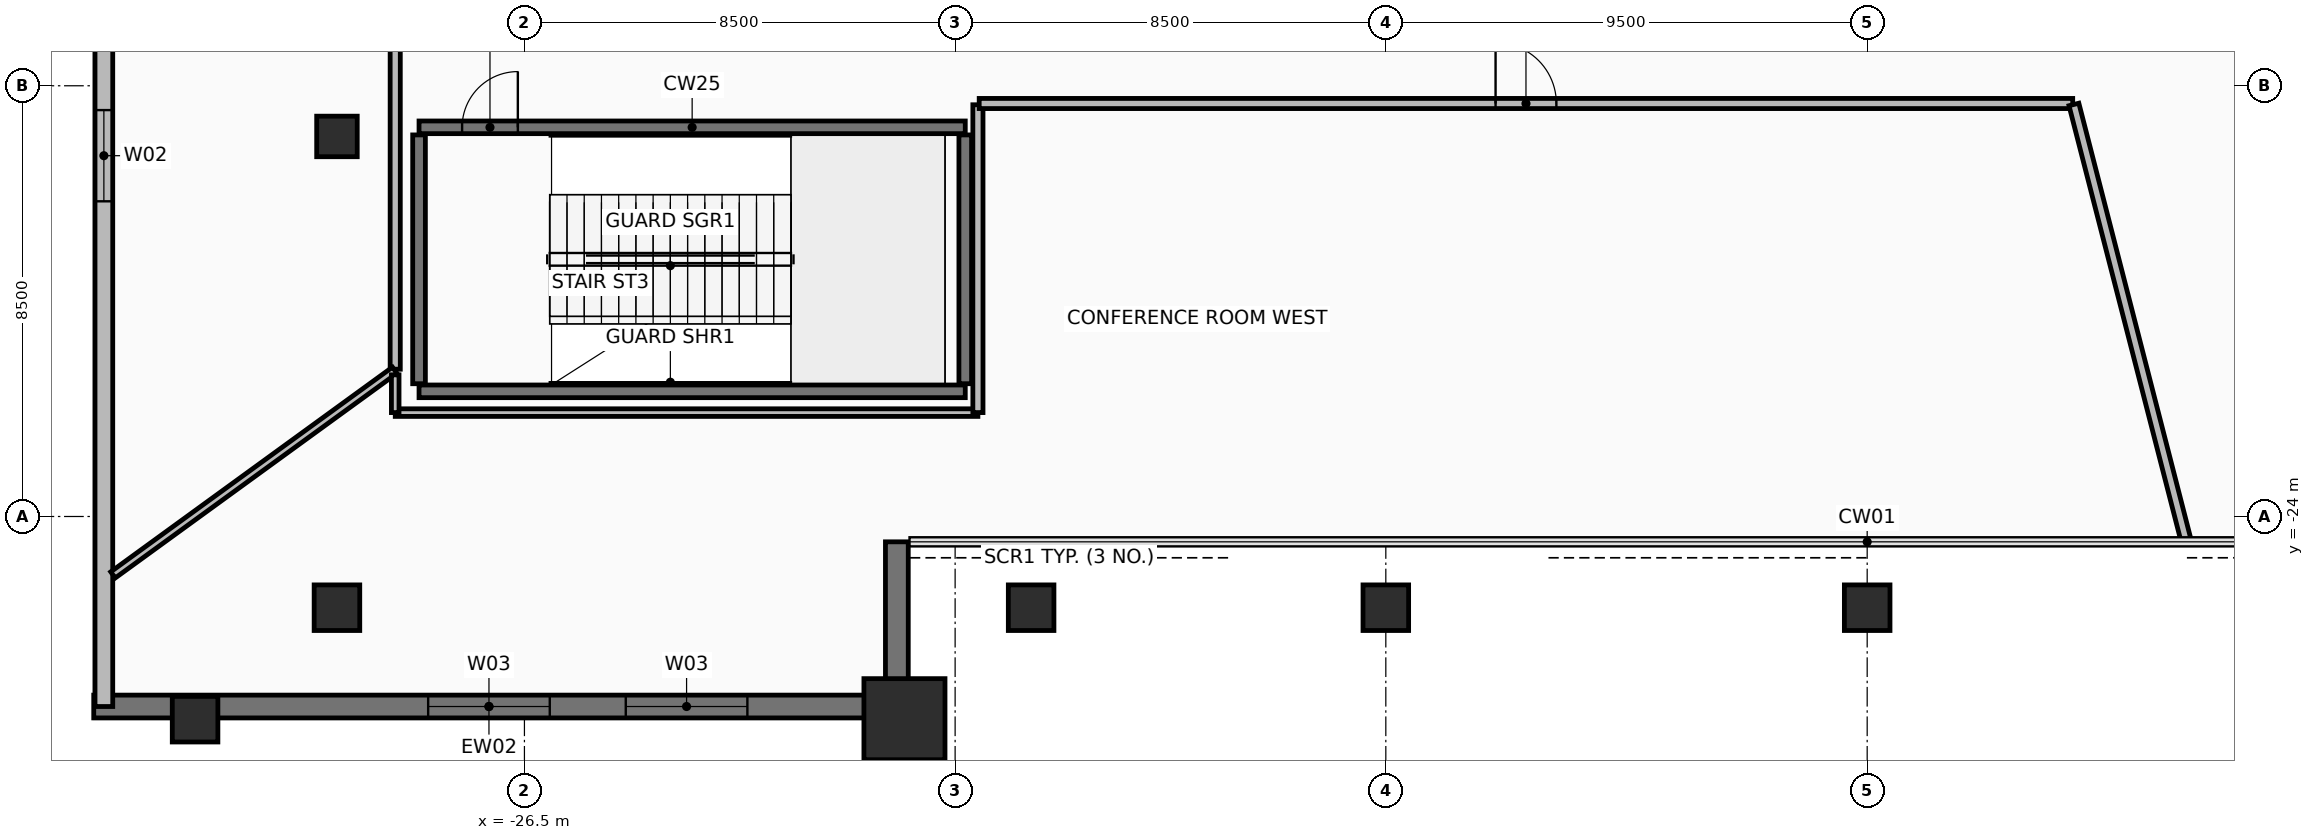
"""IFC4 building model, lengths in metres.
Left out: names, types, materials, properties, quantities, classifications, styles, units other than length and angle.
Written with IfcOpenShell. Run it as: python <this file> out.ifc"""

import sys

from ifc_helpers import new_model, si_unit, direction, frame, frame_2d, origin, origin_2d, place, context, subcontext, project, spatial, rectangle, hollow_rectangle, extrude, element, fill, save


model = new_model("IFC4")
c1 = context("Model", 3, precision=1e-05, world=origin(), true_north=direction((0.0, 1.0)))
c2 = subcontext(c1, "Body", "Model", "MODEL_VIEW")
j1 = project(units=[si_unit("LENGTHUNIT", "METRE"), si_unit("PLANEANGLEUNIT", "RADIAN")], contexts=[c1])
p1 = place(None, origin())
s1 = spatial("IfcSite", under=j1, at=p1, CompositionType="ELEMENT")
p2 = place(p1, origin())
s2 = spatial("IfcBuilding", under=s1, at=p2, CompositionType="ELEMENT")
p3 = place(p2, frame((0.0, 0.0, 11.0)))
s3 = spatial("IfcBuildingStorey", under=s2, at=p3, CompositionType="ELEMENT", Elevation=11.0)
for number, where, z_axis, x_axis in (
    (1, (-30.2, -25.8, 0.0), (0.0, 0.0, 1.0), (1.0, 0.0, 0.0)),
    (2, (-16.5, -25.8, 0.0), (0.0, 0.0, 1.0), (1.0, 0.0, 0.0)),
    (3, (-9.5, -25.8, 0.0), (0.0, 0.0, 1.0), (1.0, 0.0, 0.0)),
    (4, (0.0, -25.8, 0.0), (0.0, 0.0, 1.0), (1.0, 0.0, 0.0)),
):
    element("IfcColumn", number, at=place(p3, frame(where, z_axis=z_axis, x_axis=x_axis)), inside=s3, PredefinedType="COLUMN", context=c2, shape_type="SweptSolid", body=[
        extrude(hollow_rectangle(XDim=0.9, YDim=0.9, WallThickness=0.05, at=origin_2d()), origin(), (0.0, 0.0, 1.0), 5.5),
    ])
p4 = place(p3, frame((-30.2, -16.5, 0.0), z_axis=(0.0, 0.0, 1.0), x_axis=(1.0, 0.0, 0.0)))
e5 = element("IfcColumn", 5, at=p4, inside=s3, PredefinedType="COLUMN", context=c2, shape_type="SweptSolid", body=[
    extrude(hollow_rectangle(XDim=0.8, YDim=0.8, WallThickness=0.045, at=origin_2d()), origin(), (0.0, 0.0, 1.0), 5.5),
])
p5 = place(p3, frame((-19.0, -28.0, 0.0), z_axis=(0.0, 0.0, 1.0), x_axis=(1.0, 0.0, 0.0)))
e6 = element("IfcColumn", 6, at=p5, inside=s3, PredefinedType="COLUMN", context=c2, shape_type="SweptSolid", body=[
    extrude(rectangle(XDim=1.6, YDim=1.6, at=origin_2d()), origin(), (0.0, 0.0, 1.0), 5.5),
])
p6 = place(p3, frame((-33.0, -28.0, 0.0), z_axis=(0.0, 0.0, 1.0), x_axis=(1.0, 0.0, 0.0)))
e7 = element("IfcColumn", 7, at=p6, inside=s3, PredefinedType="COLUMN", context=c2, shape_type="SweptSolid", body=[
    extrude(hollow_rectangle(XDim=0.9, YDim=0.9, WallThickness=0.05, at=origin_2d()), origin(), (0.0, 0.0, 1.0), 5.5),
])
p7 = place(p3, frame((-35.0, -27.75, 0.0), z_axis=(0.0, 0.0, 1.0), x_axis=(1.0, 0.0, 0.0)))
e8 = element("IfcWall", 8, at=p7, inside=s3, PredefinedType="STANDARD", context=c2, shape_type="SweptSolid", body=[
    extrude(rectangle(XDim=15.6, YDim=0.45, at=frame_2d((7.8, 0.0))), origin(), (0.0, 0.0, 1.0), 5.24),
])
p8 = place(p7, frame((6.6, 0.0, 0.9)))
e9 = element("IfcOpeningElement", 9, at=p8, cuts=e8, PredefinedType="OPENING", context=c2, shape_type="SweptSolid", body=[
    extrude(rectangle(XDim=2.4, YDim=2.4, at=frame_2d((1.2, 1.2))), frame((0.0, 0.235, 0.0), z_axis=(0.0, -1.0, 0.0), x_axis=(1.0, 0.0, 0.0)), (0.0, 0.0, 1.0), 0.47),
])
p9 = place(p7, frame((10.5, 0.0, 0.9)))
e10 = element("IfcOpeningElement", 10, at=p9, cuts=e8, PredefinedType="OPENING", context=c2, shape_type="SweptSolid", body=[
    extrude(rectangle(XDim=2.4, YDim=2.4, at=frame_2d((1.2, 1.2))), frame((0.0, 0.235, 0.0), z_axis=(0.0, -1.0, 0.0), x_axis=(1.0, 0.0, 0.0)), (0.0, 0.0, 1.0), 0.47),
])
p10 = place(p3, frame((-19.15, -27.75, 0.0), z_axis=(0.0, 0.0, 1.0), x_axis=(0.0, 1.0, 0.0)))
e11 = element("IfcWall", 11, at=p10, inside=s3, PredefinedType="STANDARD", context=c2, shape_type="SweptSolid", body=[
    extrude(rectangle(XDim=3.25, YDim=0.45, at=frame_2d((1.625, 0.0))), origin(), (0.0, 0.0, 1.0), 5.24),
])
p11 = place(p3, frame((-34.8, 26.6, 0.0), z_axis=(0.0, 0.0, 1.0), x_axis=(0.0, -1.0, 0.0)))
e12 = element("IfcWall", 12, at=p11, inside=s3, PredefinedType="STANDARD", context=c2, shape_type="SweptSolid", body=[
    extrude(rectangle(XDim=54.35, YDim=0.35, at=frame_2d((27.175, 0.0))), origin(), (0.0, 0.0, 1.0), 5.24),
])
p12 = place(p11, frame((9.97, 0.0, 0.95)))
e13 = element("IfcOpeningElement", 13, at=p12, cuts=e12, PredefinedType="OPENING", context=c2, shape_type="SweptSolid", body=[
    extrude(rectangle(XDim=1.8, YDim=2.2, at=frame_2d((0.9, 1.1))), frame((0.0, 0.185, 0.0), z_axis=(0.0, -1.0, 0.0), x_axis=(1.0, 0.0, 0.0)), (0.0, 0.0, 1.0), 0.37),
])
p13 = place(p11, frame((20.84, 0.0, 0.95)))
e14 = element("IfcOpeningElement", 14, at=p13, cuts=e12, PredefinedType="OPENING", context=c2, shape_type="SweptSolid", body=[
    extrude(rectangle(XDim=1.8, YDim=2.2, at=frame_2d((0.9, 1.1))), frame((0.0, 0.185, 0.0), z_axis=(0.0, -1.0, 0.0), x_axis=(1.0, 0.0, 0.0)), (0.0, 0.0, 1.0), 0.37),
])
p14 = place(p11, frame((31.71, 0.0, 0.95)))
e15 = element("IfcOpeningElement", 15, at=p14, cuts=e12, PredefinedType="OPENING", context=c2, shape_type="SweptSolid", body=[
    extrude(rectangle(XDim=1.8, YDim=2.2, at=frame_2d((0.9, 1.1))), frame((0.0, 0.185, 0.0), z_axis=(0.0, -1.0, 0.0), x_axis=(1.0, 0.0, 0.0)), (0.0, 0.0, 1.0), 0.37),
])
p15 = place(p11, frame((42.58, 0.0, 0.95)))
e16 = element("IfcOpeningElement", 16, at=p15, cuts=e12, PredefinedType="OPENING", context=c2, shape_type="SweptSolid", body=[
    extrude(rectangle(XDim=1.8, YDim=2.2, at=frame_2d((0.9, 1.1))), frame((0.0, 0.185, 0.0), z_axis=(0.0, -1.0, 0.0), x_axis=(1.0, 0.0, 0.0)), (0.0, 0.0, 1.0), 0.37),
])
p16 = place(p3, frame((-28.58, -16.32, 0.0), z_axis=(0.0, 0.0, 1.0), x_axis=(1.0, 0.0, 0.0)))
e17 = element("IfcWall", 17, at=p16, inside=s3, PredefinedType="SHEAR", context=c2, shape_type="SweptSolid", body=[
    extrude(rectangle(XDim=10.78, YDim=0.25, at=frame_2d((5.39, 0.0))), origin(), (0.0, 0.0, 1.0), 5.24),
])
p17 = place(p16, frame((0.85, 0.0, 0.0)))
e18 = element("IfcOpeningElement", 18, at=p17, cuts=e17, PredefinedType="OPENING", context=c2, shape_type="SweptSolid", body=[
    extrude(rectangle(XDim=1.1, YDim=2.15, at=frame_2d((0.55, 1.075))), frame((0.0, 0.135, 0.0), z_axis=(0.0, -1.0, 0.0), x_axis=(1.0, 0.0, 0.0)), (0.0, 0.0, 1.0), 0.27),
])
p18 = place(p3, frame((-28.58, -21.53, 0.0), z_axis=(0.0, 0.0, 1.0), x_axis=(1.0, 0.0, 0.0)))
e19 = element("IfcWall", 19, at=p18, inside=s3, PredefinedType="SHEAR", context=c2, shape_type="SweptSolid", body=[
    extrude(rectangle(XDim=10.78, YDim=0.25, at=frame_2d((5.39, 0.0))), origin(), (0.0, 0.0, 1.0), 5.24),
])
for number, where, z_axis, x_axis in (
    (20, (-28.58, -21.38, 0.0), (0.0, 0.0, 1.0), (0.0, 1.0, 0.0)),
    (21, (-17.8, -21.38, 0.0), (0.0, 0.0, 1.0), (0.0, 1.0, 0.0)),
):
    element("IfcWall", number, at=place(p3, frame(where, z_axis=z_axis, x_axis=x_axis)), inside=s3, PredefinedType="SHEAR", context=c2, shape_type="SweptSolid", body=[
        extrude(rectangle(XDim=4.91, YDim=0.25, at=frame_2d((2.455, 0.0))), origin(), (0.0, 0.0, 1.0), 5.24),
    ])
p19 = place(p3, frame((-29.05, -12.201, 0.0), z_axis=(0.0, 0.0, 1.0), x_axis=(0.0, -1.0, 0.0)))
e22 = element("IfcWall", 22, at=p19, inside=s3, PredefinedType="PARTITIONING", context=c2, shape_type="SweptSolid", body=[
    extrude(rectangle(XDim=8.893, YDim=0.2, at=frame_2d((4.446, 0.0))), origin(), (0.0, 0.0, 1.0), 4.785),
])
p20 = place(p3, frame((-29.06, -21.114, 0.0), z_axis=(0.0, 0.0, 1.0), x_axis=(-0.809026336195, -0.587772394166, 0.0)))
e23 = element("IfcWall", 23, at=p20, inside=s3, PredefinedType="PARTITIONING", context=c2, shape_type="SweptSolid", body=[
    extrude(rectangle(XDim=6.872, YDim=0.15, at=frame_2d((3.436, 0.0))), origin(), (0.0, 0.0, 1.0), 4.435),
])
p21 = place(p3, frame((-29.049, -21.95, 0.0), z_axis=(0.0, 0.0, 1.0), x_axis=(1.0, 0.0, 0.0)))
e24 = element("IfcWall", 24, at=p21, inside=s3, PredefinedType="PARTITIONING", context=c2, shape_type="SweptSolid", body=[
    extrude(rectangle(XDim=11.499, YDim=0.15, at=frame_2d((5.75, 0.0))), origin(), (0.0, 0.0, 1.0), 5.24),
])
p22 = place(p3, frame((-17.55, -21.949, 0.0), z_axis=(0.0, 0.0, 1.0), x_axis=(0.0, 1.0, 0.0)))
e25 = element("IfcWall", 25, at=p22, inside=s3, PredefinedType="PARTITIONING", context=c2, shape_type="SweptSolid", body=[
    extrude(rectangle(XDim=6.074, YDim=0.2, at=frame_2d((3.037, 0.0))), origin(), (0.0, 0.0, 1.0), 5.24),
])
p23 = place(p3, frame((-17.525, -15.85, 0.0), z_axis=(0.0, 0.0, 1.0), x_axis=(1.0, 0.0, 0.0)))
e26 = element("IfcWall", 26, at=p23, inside=s3, PredefinedType="PARTITIONING", context=c2, shape_type="SweptSolid", body=[
    extrude(rectangle(XDim=21.581, YDim=0.2, at=frame_2d((10.791, 0.0))), origin(), (0.0, 0.0, 1.0), 2.935),
])
p24 = place(p23, frame((10.191, 0.0, 0.0)))
e27 = element("IfcOpeningElement", 27, at=p24, cuts=e26, PredefinedType="OPENING", context=c2, shape_type="SweptSolid", body=[
    extrude(rectangle(XDim=1.2, YDim=2.15, at=frame_2d((0.6, 1.075))), frame((0.0, 0.11, 0.0), z_axis=(0.0, -1.0, 0.0), x_axis=(1.0, 0.0, 0.0)), (0.0, 0.0, 1.0), 0.22),
])
p25 = place(p3, frame((4.08, -15.869, 0.0), z_axis=(0.0, 0.0, 1.0), x_axis=(0.249021217136, -0.96849802964, 0.0)))
e28 = element("IfcWall", 28, at=p25, inside=s3, PredefinedType="PARTITIONING", context=c2, shape_type="SweptSolid", body=[
    extrude(rectangle(XDim=8.912, YDim=0.2, at=frame_2d((4.456, 0.0))), origin(), (0.0, 0.0, 1.0), 4.785),
])
p26 = place(p3, frame((-29.05, -21.205, 0.0), z_axis=(0.0, 0.0, 1.0), x_axis=(0.0, -1.0, 0.0)))
e29 = element("IfcWall", 29, at=p26, inside=s3, PredefinedType="PARTITIONING", context=c2, shape_type="SweptSolid", body=[
    extrude(rectangle(XDim=0.745, YDim=0.15, at=frame_2d((0.372, 0.0))), origin(), (0.0, 0.0, 1.0), 5.24),
])
p27 = place(p8, origin())
e30 = element("IfcWindow", 30, at=p27, inside=s3, PartitioningType="SINGLE_PANEL", PredefinedType="WINDOW", context=c2, shape_type="SweptSolid", body=[
    extrude(rectangle(XDim=2.4, YDim=2.4, at=frame_2d((1.2, 1.2))), frame((0.0, 0.03, 0.0), z_axis=(0.0, -1.0, 0.0), x_axis=(1.0, 0.0, 0.0)), (0.0, 0.0, 1.0), 0.06),
])
fill(e9, e30)
p28 = place(p9, origin())
e31 = element("IfcWindow", 31, at=p28, inside=s3, PartitioningType="SINGLE_PANEL", PredefinedType="WINDOW", context=c2, shape_type="SweptSolid", body=[
    extrude(rectangle(XDim=2.4, YDim=2.4, at=frame_2d((1.2, 1.2))), frame((0.0, 0.03, 0.0), z_axis=(0.0, -1.0, 0.0), x_axis=(1.0, 0.0, 0.0)), (0.0, 0.0, 1.0), 0.06),
])
fill(e10, e31)
p29 = place(p15, origin())
e32 = element("IfcWindow", 32, at=p29, inside=s3, PartitioningType="SINGLE_PANEL", PredefinedType="WINDOW", context=c2, shape_type="SweptSolid", body=[
    extrude(rectangle(XDim=1.8, YDim=2.2, at=frame_2d((0.9, 1.1))), frame((0.0, 0.03, 0.0), z_axis=(0.0, -1.0, 0.0), x_axis=(1.0, 0.0, 0.0)), (0.0, 0.0, 1.0), 0.06),
])
fill(e16, e32)
p30 = place(p17, frame((1.1, 0.0, 0.0), z_axis=(0.0, 0.0, 1.0), x_axis=(-1.0, 0.0, 0.0)))
e33 = element("IfcDoor", 33, at=p30, inside=s3, OperationType="SINGLE_SWING_LEFT", PredefinedType="DOOR", context=c2, shape_type="SweptSolid", body=[
    extrude(rectangle(XDim=1.1, YDim=2.15, at=frame_2d((0.55, 1.075))), frame((0.0, 0.025, 0.0), z_axis=(0.0, -1.0, 0.0), x_axis=(1.0, 0.0, 0.0)), (0.0, 0.0, 1.0), 0.05),
])
fill(e18, e33)
p31 = place(p24, origin())
e34 = element("IfcDoor", 34, at=p31, inside=s3, OperationType="SINGLE_SWING_LEFT", PredefinedType="DOOR", context=c2, shape_type="SweptSolid", body=[
    extrude(rectangle(XDim=1.2, YDim=2.15, at=frame_2d((0.6, 1.075))), frame((0.0, 0.025, 0.0), z_axis=(0.0, -1.0, 0.0), x_axis=(1.0, 0.0, 0.0)), (0.0, 0.0, 1.0), 0.05),
])
fill(e27, e34)
save(model, sys.argv[1])
